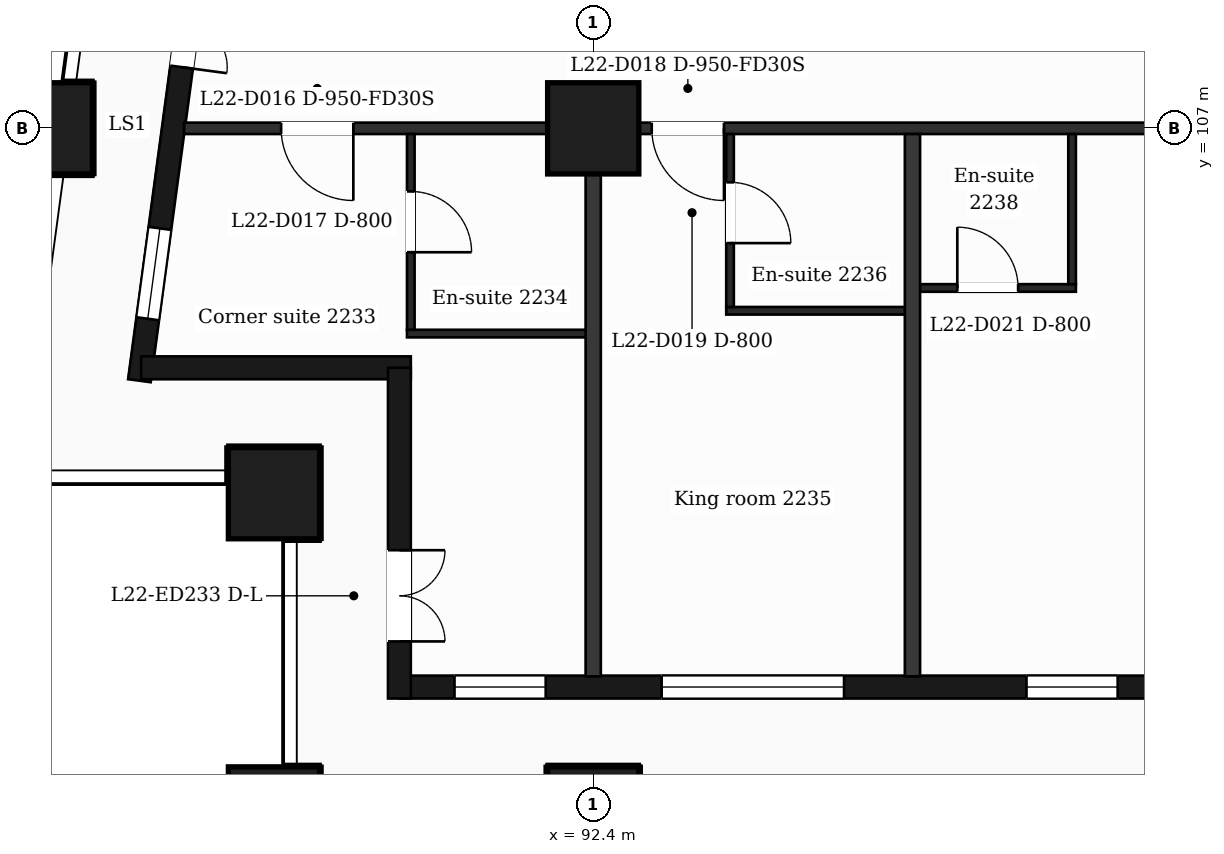
"""IFC4 building model, lengths in metres.
Left out: names, types, materials, properties, quantities, classifications, styles, units other than length and angle.
Written with IfcOpenShell. Run it as: python <this file> out.ifc"""

import sys

from ifc_helpers import new_model, si_unit, direction, frame, frame_2d, origin, origin_2d, place, context, subcontext, project, spatial, rectangle, extrude, element, fill, save


model = new_model("IFC4")
c1 = context("Model", 3, precision=1e-05, world=origin(), true_north=direction((0.0, 1.0)))
c2 = subcontext(c1, "Body", "Model", "MODEL_VIEW")
j1 = project(units=[si_unit("LENGTHUNIT", "METRE"), si_unit("PLANEANGLEUNIT", "RADIAN")], contexts=[c1])
p1 = place(None, origin())
s1 = spatial("IfcSite", under=j1, at=p1, CompositionType="ELEMENT")
p2 = place(p1, origin())
s2 = spatial("IfcBuilding", under=s1, at=p2, CompositionType="ELEMENT")
p3 = place(p2, frame((0.0, 0.0, 98.4)))
s3 = spatial("IfcBuildingStorey", under=s2, at=p3, CompositionType="ELEMENT", Elevation=98.4)
for number, where, z_axis, x_axis in (
    (1, (92.4, 98.0, 0.0), (0.0, 0.0, 1.0), (1.0, 0.0, 0.0)),
    (2, (88.2, 98.0, 0.0), (0.0, 0.0, 1.0), (1.0, 0.0, 0.0)),
    (3, (88.2, 102.2, 0.0), (0.0, 0.0, 1.0), (1.0, 0.0, 0.0)),
    (4, (92.4, 107.0, 0.0), (0.0, 0.0, 1.0), (1.0, 0.0, 0.0)),
    (5, (85.211, 107.0, 0.0), (0.0, 0.0, 1.0), (1.0, 0.0, 0.0)),
):
    element("IfcColumn", number, at=place(p3, frame(where, z_axis=z_axis, x_axis=x_axis)), inside=s3, PredefinedType="COLUMN", context=c2, shape_type="SweptSolid", body=[
        extrude(rectangle(XDim=1.2, YDim=1.2, at=origin_2d()), origin(), (0.0, 0.0, 1.0), 3.7),
    ])
p4 = place(p3, frame((89.85, 99.65, 0.0), z_axis=(0.0, 0.0, 1.0), x_axis=(1.0, 0.0, 0.0)))
e6 = element("IfcWall", 6, at=p4, inside=s3, PredefinedType="SOLIDWALL", context=c2, shape_type="SweptSolid", body=[
    extrude(rectangle(XDim=47.25, YDim=0.3, at=frame_2d((23.625, 0.0))), origin(), (0.0, 0.0, 1.0), 3.38),
])
p5 = place(p4, frame((0.725, 0.0, 0.9)))
e7 = element("IfcOpeningElement", 7, at=p5, cuts=e6, PredefinedType="OPENING", context=c2, shape_type="SweptSolid", body=[
    extrude(rectangle(XDim=1.2, YDim=2.1, at=frame_2d((0.6, 1.05))), frame((0.0, 0.16, 0.0), z_axis=(0.0, -1.0, 0.0), x_axis=(1.0, 0.0, 0.0)), (0.0, 0.0, 1.0), 0.32),
])
p6 = place(p4, frame((3.45, 0.0, 0.9)))
e8 = element("IfcOpeningElement", 8, at=p6, cuts=e6, PredefinedType="OPENING", context=c2, shape_type="SweptSolid", body=[
    extrude(rectangle(XDim=2.4, YDim=2.1, at=frame_2d((1.2, 1.05))), frame((0.0, 0.16, 0.0), z_axis=(0.0, -1.0, 0.0), x_axis=(1.0, 0.0, 0.0)), (0.0, 0.0, 1.0), 0.32),
])
p7 = place(p4, frame((8.25, 0.0, 0.9)))
e9 = element("IfcOpeningElement", 9, at=p7, cuts=e6, PredefinedType="OPENING", context=c2, shape_type="SweptSolid", body=[
    extrude(rectangle(XDim=1.2, YDim=2.1, at=frame_2d((0.6, 1.05))), frame((0.0, 0.16, 0.0), z_axis=(0.0, -1.0, 0.0), x_axis=(1.0, 0.0, 0.0)), (0.0, 0.0, 1.0), 0.32),
])
p8 = place(p4, frame((12.45, 0.0, 0.9)))
e10 = element("IfcOpeningElement", 10, at=p8, cuts=e6, PredefinedType="OPENING", context=c2, shape_type="SweptSolid", body=[
    extrude(rectangle(XDim=1.2, YDim=2.1, at=frame_2d((0.6, 1.05))), frame((0.0, 0.16, 0.0), z_axis=(0.0, -1.0, 0.0), x_axis=(1.0, 0.0, 0.0)), (0.0, 0.0, 1.0), 0.32),
])
p9 = place(p4, frame((16.05, 0.0, 0.9)))
e11 = element("IfcOpeningElement", 11, at=p9, cuts=e6, PredefinedType="OPENING", context=c2, shape_type="SweptSolid", body=[
    extrude(rectangle(XDim=2.4, YDim=2.1, at=frame_2d((1.2, 1.05))), frame((0.0, 0.16, 0.0), z_axis=(0.0, -1.0, 0.0), x_axis=(1.0, 0.0, 0.0)), (0.0, 0.0, 1.0), 0.32),
])
p10 = place(p4, frame((20.25, 0.0, 0.9)))
e12 = element("IfcOpeningElement", 12, at=p10, cuts=e6, PredefinedType="OPENING", context=c2, shape_type="SweptSolid", body=[
    extrude(rectangle(XDim=2.4, YDim=2.1, at=frame_2d((1.2, 1.05))), frame((0.0, 0.16, 0.0), z_axis=(0.0, -1.0, 0.0), x_axis=(1.0, 0.0, 0.0)), (0.0, 0.0, 1.0), 0.32),
])
p11 = place(p4, frame((25.05, 0.0, 0.0)))
e13 = element("IfcOpeningElement", 13, at=p11, cuts=e6, PredefinedType="OPENING", context=c2, shape_type="SweptSolid", body=[
    extrude(rectangle(XDim=1.2, YDim=2.4, at=frame_2d((0.6, 1.2))), frame((0.0, 0.16, 0.0), z_axis=(0.0, -1.0, 0.0), x_axis=(1.0, 0.0, 0.0)), (0.0, 0.0, 1.0), 0.32),
])
p12 = place(p4, frame((28.65, 0.0, 0.9)))
e14 = element("IfcOpeningElement", 14, at=p12, cuts=e6, PredefinedType="OPENING", context=c2, shape_type="SweptSolid", body=[
    extrude(rectangle(XDim=2.4, YDim=2.1, at=frame_2d((1.2, 1.05))), frame((0.0, 0.16, 0.0), z_axis=(0.0, -1.0, 0.0), x_axis=(1.0, 0.0, 0.0)), (0.0, 0.0, 1.0), 0.32),
])
p13 = place(p4, frame((32.85, 0.0, 0.9)))
e15 = element("IfcOpeningElement", 15, at=p13, cuts=e6, PredefinedType="OPENING", context=c2, shape_type="SweptSolid", body=[
    extrude(rectangle(XDim=2.4, YDim=2.1, at=frame_2d((1.2, 1.05))), frame((0.0, 0.16, 0.0), z_axis=(0.0, -1.0, 0.0), x_axis=(1.0, 0.0, 0.0)), (0.0, 0.0, 1.0), 0.32),
])
p14 = place(p4, frame((37.65, 0.0, 0.9)))
e16 = element("IfcOpeningElement", 16, at=p14, cuts=e6, PredefinedType="OPENING", context=c2, shape_type="SweptSolid", body=[
    extrude(rectangle(XDim=1.2, YDim=2.1, at=frame_2d((0.6, 1.05))), frame((0.0, 0.16, 0.0), z_axis=(0.0, -1.0, 0.0), x_axis=(1.0, 0.0, 0.0)), (0.0, 0.0, 1.0), 0.32),
])
p15 = place(p4, frame((41.85, 0.0, 0.9)))
e17 = element("IfcOpeningElement", 17, at=p15, cuts=e6, PredefinedType="OPENING", context=c2, shape_type="SweptSolid", body=[
    extrude(rectangle(XDim=1.2, YDim=2.1, at=frame_2d((0.6, 1.05))), frame((0.0, 0.16, 0.0), z_axis=(0.0, -1.0, 0.0), x_axis=(1.0, 0.0, 0.0)), (0.0, 0.0, 1.0), 0.32),
])
p16 = place(p4, frame((45.25, 0.0, 0.9)))
e18 = element("IfcOpeningElement", 18, at=p16, cuts=e6, PredefinedType="OPENING", context=c2, shape_type="SweptSolid", body=[
    extrude(rectangle(XDim=1.2, YDim=2.1, at=frame_2d((0.6, 1.05))), frame((0.0, 0.16, 0.0), z_axis=(0.0, -1.0, 0.0), x_axis=(1.0, 0.0, 0.0)), (0.0, 0.0, 1.0), 0.32),
])
p17 = place(p3, frame((87.334, 110.4, 0.0), z_axis=(0.0, 0.0, 1.0), x_axis=(-0.133437175554, -0.991057273915, 0.0)))
e19 = element("IfcWall", 19, at=p17, inside=s3, PredefinedType="SOLIDWALL", context=c2, shape_type="SweptSolid", body=[
    extrude(rectangle(XDim=6.781, YDim=0.3, at=frame_2d((3.39, 0.0))), origin(), (0.0, 0.0, 1.0), 3.38),
])
p18 = place(p17, frame((1.418, 0.0, 0.0)))
e20 = element("IfcOpeningElement", 20, at=p18, cuts=e19, PredefinedType="OPENING", context=c2, shape_type="SweptSolid", body=[
    extrude(rectangle(XDim=1.2, YDim=2.4, at=frame_2d((0.6, 1.2))), frame((0.0, 0.16, 0.0), z_axis=(0.0, -1.0, 0.0), x_axis=(1.0, 0.0, 0.0)), (0.0, 0.0, 1.0), 0.32),
])
p19 = place(p17, frame((4.758, 0.0, 0.9)))
e21 = element("IfcOpeningElement", 21, at=p19, cuts=e19, PredefinedType="OPENING", context=c2, shape_type="SweptSolid", body=[
    extrude(rectangle(XDim=1.2, YDim=2.1, at=frame_2d((0.6, 1.05))), frame((0.0, 0.16, 0.0), z_axis=(0.0, -1.0, 0.0), x_axis=(1.0, 0.0, 0.0)), (0.0, 0.0, 1.0), 0.32),
])
p20 = place(p3, frame((86.452, 103.85, 0.0), z_axis=(0.0, 0.0, 1.0), x_axis=(1.0, 0.0, 0.0)))
e22 = element("IfcWall", 22, at=p20, inside=s3, PredefinedType="SOLIDWALL", context=c2, shape_type="SweptSolid", body=[
    extrude(rectangle(XDim=3.548, YDim=0.3, at=frame_2d((1.774, 0.0))), origin(), (0.0, 0.0, 1.0), 3.38),
])
p21 = place(p3, frame((89.85, 103.85, 0.0), z_axis=(0.0, 0.0, 1.0), x_axis=(0.0, -1.0, 0.0)))
e23 = element("IfcWall", 23, at=p21, inside=s3, PredefinedType="SOLIDWALL", context=c2, shape_type="SweptSolid", body=[
    extrude(rectangle(XDim=4.35, YDim=0.3, at=frame_2d((2.175, 0.0))), origin(), (0.0, 0.0, 1.0), 3.38),
])
p22 = place(p21, frame((2.4, 0.0, 0.0)))
e24 = element("IfcOpeningElement", 24, at=p22, cuts=e23, PredefinedType="OPENING", context=c2, shape_type="SweptSolid", body=[
    extrude(rectangle(XDim=1.2, YDim=2.4, at=frame_2d((0.6, 1.2))), frame((0.0, 0.16, 0.0), z_axis=(0.0, -1.0, 0.0), x_axis=(1.0, 0.0, 0.0)), (0.0, 0.0, 1.0), 0.32),
])
p23 = place(p3, frame((89.95, 104.3, 0.0), z_axis=(0.0, 0.0, 1.0), x_axis=(1.0, 0.0, 0.0)))
e25 = element("IfcWall", 25, at=p23, inside=s3, PredefinedType="PARTITIONING", context=c2, shape_type="SweptSolid", body=[
    extrude(rectangle(XDim=2.45, YDim=0.1, at=frame_2d((1.225, 0.0))), origin(), (0.0, 0.0, 1.0), 3.38),
])
p24 = place(p3, frame((94.15, 104.6, 0.0), z_axis=(0.0, 0.0, 1.0), x_axis=(1.0, 0.0, 0.0)))
e26 = element("IfcWall", 26, at=p24, inside=s3, PredefinedType="PARTITIONING", context=c2, shape_type="SweptSolid", body=[
    extrude(rectangle(XDim=2.45, YDim=0.1, at=frame_2d((1.225, 0.0))), origin(), (0.0, 0.0, 1.0), 3.38),
])
p25 = place(p3, frame((96.6, 104.9, 0.0), z_axis=(0.0, 0.0, 1.0), x_axis=(1.0, 0.0, 0.0)))
e27 = element("IfcWall", 27, at=p25, inside=s3, PredefinedType="PARTITIONING", context=c2, shape_type="SweptSolid", body=[
    extrude(rectangle(XDim=2.15, YDim=0.1, at=frame_2d((1.075, 0.0))), origin(), (0.0, 0.0, 1.0), 3.38),
])
p26 = place(p25, frame((0.59, 0.0, 0.0)))
e28 = element("IfcOpeningElement", 28, at=p26, cuts=e27, PredefinedType="OPENING", context=c2, shape_type="SweptSolid", body=[
    extrude(rectangle(XDim=0.8, YDim=2.1, at=frame_2d((0.4, 1.05))), frame((0.0, 0.06, 0.0), z_axis=(0.0, -1.0, 0.0), x_axis=(1.0, 0.0, 0.0)), (0.0, 0.0, 1.0), 0.12),
])
p27 = place(p3, frame((87.018, 107.0, 0.0), z_axis=(0.0, 0.0, 1.0), x_axis=(1.0, 0.0, 0.0)))
e29 = element("IfcWall", 29, at=p27, inside=s3, PredefinedType="PARTITIONING", context=c2, shape_type="SweptSolid", body=[
    extrude(rectangle(XDim=52.765, YDim=0.15, at=frame_2d((26.382, 0.0))), origin(), (0.0, 0.0, 1.0), 3.38),
])
p28 = place(p27, frame((1.276, 0.0, 0.0)))
e30 = element("IfcOpeningElement", 30, at=p28, cuts=e29, PredefinedType="OPENING", context=c2, shape_type="SweptSolid", body=[
    extrude(rectangle(XDim=0.95, YDim=2.1, at=frame_2d((0.475, 1.05))), frame((0.0, 0.085, 0.0), z_axis=(0.0, -1.0, 0.0), x_axis=(1.0, 0.0, 0.0)), (0.0, 0.0, 1.0), 0.17),
])
p29 = place(p27, frame((6.152, 0.0, 0.0)))
e31 = element("IfcOpeningElement", 31, at=p29, cuts=e29, PredefinedType="OPENING", context=c2, shape_type="SweptSolid", body=[
    extrude(rectangle(XDim=0.95, YDim=2.1, at=frame_2d((0.475, 1.05))), frame((0.0, 0.085, 0.0), z_axis=(0.0, -1.0, 0.0), x_axis=(1.0, 0.0, 0.0)), (0.0, 0.0, 1.0), 0.17),
])
p30 = place(p27, frame((14.59, 0.0, 0.0)))
e32 = element("IfcOpeningElement", 32, at=p30, cuts=e29, PredefinedType="OPENING", context=c2, shape_type="SweptSolid", body=[
    extrude(rectangle(XDim=0.95, YDim=2.1, at=frame_2d((0.475, 1.05))), frame((0.0, 0.085, 0.0), z_axis=(0.0, -1.0, 0.0), x_axis=(1.0, 0.0, 0.0)), (0.0, 0.0, 1.0), 0.17),
])
p31 = place(p27, frame((18.257, 0.0, 0.0)))
e33 = element("IfcOpeningElement", 33, at=p31, cuts=e29, PredefinedType="OPENING", context=c2, shape_type="SweptSolid", body=[
    extrude(rectangle(XDim=0.95, YDim=2.1, at=frame_2d((0.475, 1.05))), frame((0.0, 0.085, 0.0), z_axis=(0.0, -1.0, 0.0), x_axis=(1.0, 0.0, 0.0)), (0.0, 0.0, 1.0), 0.17),
])
p32 = place(p27, frame((26.672, 0.0, 0.0)))
e34 = element("IfcOpeningElement", 34, at=p32, cuts=e29, PredefinedType="OPENING", context=c2, shape_type="SweptSolid", body=[
    extrude(rectangle(XDim=0.95, YDim=2.1, at=frame_2d((0.475, 1.05))), frame((0.0, 0.085, 0.0), z_axis=(0.0, -1.0, 0.0), x_axis=(1.0, 0.0, 0.0)), (0.0, 0.0, 1.0), 0.17),
])
p33 = place(p27, frame((31.392, 0.0, 0.0)))
e35 = element("IfcOpeningElement", 35, at=p33, cuts=e29, PredefinedType="OPENING", context=c2, shape_type="SweptSolid", body=[
    extrude(rectangle(XDim=0.95, YDim=2.1, at=frame_2d((0.475, 1.05))), frame((0.0, 0.085, 0.0), z_axis=(0.0, -1.0, 0.0), x_axis=(1.0, 0.0, 0.0)), (0.0, 0.0, 1.0), 0.17),
])
p34 = place(p27, frame((37.182, 0.0, 0.0)))
e36 = element("IfcOpeningElement", 36, at=p34, cuts=e29, PredefinedType="OPENING", context=c2, shape_type="SweptSolid", body=[
    extrude(rectangle(XDim=0.95, YDim=2.1, at=frame_2d((0.475, 1.05))), frame((0.0, 0.085, 0.0), z_axis=(0.0, -1.0, 0.0), x_axis=(1.0, 0.0, 0.0)), (0.0, 0.0, 1.0), 0.17),
])
p35 = place(p27, frame((41.762, 0.0, 0.0)))
e37 = element("IfcOpeningElement", 37, at=p35, cuts=e29, PredefinedType="OPENING", context=c2, shape_type="SweptSolid", body=[
    extrude(rectangle(XDim=0.95, YDim=2.1, at=frame_2d((0.475, 1.05))), frame((0.0, 0.085, 0.0), z_axis=(0.0, -1.0, 0.0), x_axis=(1.0, 0.0, 0.0)), (0.0, 0.0, 1.0), 0.17),
])
p36 = place(p27, frame((49.285, 0.0, 0.0)))
e38 = element("IfcOpeningElement", 38, at=p36, cuts=e29, PredefinedType="OPENING", context=c2, shape_type="SweptSolid", body=[
    extrude(rectangle(XDim=0.95, YDim=2.1, at=frame_2d((0.475, 1.05))), frame((0.0, 0.085, 0.0), z_axis=(0.0, -1.0, 0.0), x_axis=(1.0, 0.0, 0.0)), (0.0, 0.0, 1.0), 0.17),
])
p37 = place(p3, frame((90.0, 104.35, 0.0), z_axis=(0.0, 0.0, 1.0), x_axis=(0.0, 1.0, 0.0)))
e39 = element("IfcWall", 39, at=p37, inside=s3, PredefinedType="PARTITIONING", context=c2, shape_type="SweptSolid", body=[
    extrude(rectangle(XDim=2.575, YDim=0.1, at=frame_2d((1.288, 0.0))), origin(), (0.0, 0.0, 1.0), 3.38),
])
p38 = place(p37, frame((1.02, 0.0, 0.0)))
e40 = element("IfcOpeningElement", 40, at=p38, cuts=e39, PredefinedType="OPENING", context=c2, shape_type="SweptSolid", body=[
    extrude(rectangle(XDim=0.8, YDim=2.1, at=frame_2d((0.4, 1.05))), frame((0.0, 0.06, 0.0), z_axis=(0.0, -1.0, 0.0), x_axis=(1.0, 0.0, 0.0)), (0.0, 0.0, 1.0), 0.12),
])
p39 = place(p3, frame((92.4, 99.79, 0.0), z_axis=(0.0, 0.0, 1.0), x_axis=(0.0, 1.0, 0.0)))
e41 = element("IfcWall", 41, at=p39, inside=s3, PredefinedType="PARTITIONING", context=c2, shape_type="SweptSolid", body=[
    extrude(rectangle(XDim=7.135, YDim=0.2, at=frame_2d((3.567, 0.0))), origin(), (0.0, 0.0, 1.0), 3.38),
])
p40 = place(p3, frame((94.2, 104.65, 0.0), z_axis=(0.0, 0.0, 1.0), x_axis=(0.0, 1.0, 0.0)))
e42 = element("IfcWall", 42, at=p40, inside=s3, PredefinedType="PARTITIONING", context=c2, shape_type="SweptSolid", body=[
    extrude(rectangle(XDim=2.275, YDim=0.1, at=frame_2d((1.138, 0.0))), origin(), (0.0, 0.0, 1.0), 3.38),
])
p41 = place(p40, frame((0.84, 0.0, 0.0)))
e43 = element("IfcOpeningElement", 43, at=p41, cuts=e42, PredefinedType="OPENING", context=c2, shape_type="SweptSolid", body=[
    extrude(rectangle(XDim=0.8, YDim=2.1, at=frame_2d((0.4, 1.05))), frame((0.0, 0.06, 0.0), z_axis=(0.0, -1.0, 0.0), x_axis=(1.0, 0.0, 0.0)), (0.0, 0.0, 1.0), 0.12),
])
p42 = place(p3, frame((96.6, 99.79, 0.0), z_axis=(0.0, 0.0, 1.0), x_axis=(0.0, 1.0, 0.0)))
e44 = element("IfcWall", 44, at=p42, inside=s3, PredefinedType="PARTITIONING", context=c2, shape_type="SweptSolid", body=[
    extrude(rectangle(XDim=7.135, YDim=0.2, at=frame_2d((3.567, 0.0))), origin(), (0.0, 0.0, 1.0), 3.38),
])
p43 = place(p3, frame((98.7, 104.95, 0.0), z_axis=(0.0, 0.0, 1.0), x_axis=(0.0, 1.0, 0.0)))
e45 = element("IfcWall", 45, at=p43, inside=s3, PredefinedType="PARTITIONING", context=c2, shape_type="SweptSolid", body=[
    extrude(rectangle(XDim=1.975, YDim=0.1, at=frame_2d((0.988, 0.0))), origin(), (0.0, 0.0, 1.0), 3.38),
])
p44 = place(p5, origin())
e46 = element("IfcWindow", 46, at=p44, inside=s3, PartitioningType="SINGLE_PANEL", PredefinedType="WINDOW", context=c2, shape_type="SweptSolid", body=[
    extrude(rectangle(XDim=1.2, YDim=2.1, at=frame_2d((0.6, 1.05))), frame((0.0, 0.03, 0.0), z_axis=(0.0, -1.0, 0.0), x_axis=(1.0, 0.0, 0.0)), (0.0, 0.0, 1.0), 0.06),
])
fill(e7, e46)
p45 = place(p6, origin())
e47 = element("IfcWindow", 47, at=p45, inside=s3, PartitioningType="SINGLE_PANEL", PredefinedType="WINDOW", context=c2, shape_type="SweptSolid", body=[
    extrude(rectangle(XDim=2.4, YDim=2.1, at=frame_2d((1.2, 1.05))), frame((0.0, 0.03, 0.0), z_axis=(0.0, -1.0, 0.0), x_axis=(1.0, 0.0, 0.0)), (0.0, 0.0, 1.0), 0.06),
])
fill(e8, e47)
p46 = place(p7, origin())
e48 = element("IfcWindow", 48, at=p46, inside=s3, PartitioningType="SINGLE_PANEL", PredefinedType="WINDOW", context=c2, shape_type="SweptSolid", body=[
    extrude(rectangle(XDim=1.2, YDim=2.1, at=frame_2d((0.6, 1.05))), frame((0.0, 0.03, 0.0), z_axis=(0.0, -1.0, 0.0), x_axis=(1.0, 0.0, 0.0)), (0.0, 0.0, 1.0), 0.06),
])
fill(e9, e48)
p47 = place(p18, origin())
e49 = element("IfcDoor", 49, at=p47, inside=s3, OperationType="DOUBLE_DOOR_SINGLE_SWING", PredefinedType="DOOR", context=c2, shape_type="SweptSolid", body=[
    extrude(rectangle(XDim=1.2, YDim=2.4, at=frame_2d((0.6, 1.2))), frame((0.0, 0.025, 0.0), z_axis=(0.0, -1.0, 0.0), x_axis=(1.0, 0.0, 0.0)), (0.0, 0.0, 1.0), 0.05),
])
fill(e20, e49)
p48 = place(p19, origin())
e50 = element("IfcWindow", 50, at=p48, inside=s3, PartitioningType="SINGLE_PANEL", PredefinedType="WINDOW", context=c2, shape_type="SweptSolid", body=[
    extrude(rectangle(XDim=1.2, YDim=2.1, at=frame_2d((0.6, 1.05))), frame((0.0, 0.03, 0.0), z_axis=(0.0, -1.0, 0.0), x_axis=(1.0, 0.0, 0.0)), (0.0, 0.0, 1.0), 0.06),
])
fill(e21, e50)
p49 = place(p22, origin())
e51 = element("IfcDoor", 51, at=p49, inside=s3, OperationType="DOUBLE_DOOR_SINGLE_SWING", PredefinedType="DOOR", context=c2, shape_type="SweptSolid", body=[
    extrude(rectangle(XDim=1.2, YDim=2.4, at=frame_2d((0.6, 1.2))), frame((0.0, 0.025, 0.0), z_axis=(0.0, -1.0, 0.0), x_axis=(1.0, 0.0, 0.0)), (0.0, 0.0, 1.0), 0.05),
])
fill(e24, e51)
p50 = place(p28, origin())
e52 = element("IfcDoor", 52, at=p50, inside=s3, OperationType="SINGLE_SWING_RIGHT", PredefinedType="DOOR", context=c2, shape_type="SweptSolid", body=[
    extrude(rectangle(XDim=0.95, YDim=2.1, at=frame_2d((0.475, 1.05))), frame((0.0, 0.025, 0.0), z_axis=(0.0, -1.0, 0.0), x_axis=(1.0, 0.0, 0.0)), (0.0, 0.0, 1.0), 0.05),
])
fill(e30, e52)
p51 = place(p38, origin())
e53 = element("IfcDoor", 53, at=p51, inside=s3, OperationType="SINGLE_SWING_LEFT", PredefinedType="DOOR", context=c2, shape_type="SweptSolid", body=[
    extrude(rectangle(XDim=0.8, YDim=2.1, at=frame_2d((0.4, 1.05))), frame((0.0, 0.025, 0.0), z_axis=(0.0, -1.0, 0.0), x_axis=(1.0, 0.0, 0.0)), (0.0, 0.0, 1.0), 0.05),
])
fill(e40, e53)
p52 = place(p29, origin())
e54 = element("IfcDoor", 54, at=p52, inside=s3, OperationType="SINGLE_SWING_RIGHT", PredefinedType="DOOR", context=c2, shape_type="SweptSolid", body=[
    extrude(rectangle(XDim=0.95, YDim=2.1, at=frame_2d((0.475, 1.05))), frame((0.0, 0.025, 0.0), z_axis=(0.0, -1.0, 0.0), x_axis=(1.0, 0.0, 0.0)), (0.0, 0.0, 1.0), 0.05),
])
fill(e31, e54)
p53 = place(p41, origin())
e55 = element("IfcDoor", 55, at=p53, inside=s3, OperationType="SINGLE_SWING_LEFT", PredefinedType="DOOR", context=c2, shape_type="SweptSolid", body=[
    extrude(rectangle(XDim=0.8, YDim=2.1, at=frame_2d((0.4, 1.05))), frame((0.0, 0.025, 0.0), z_axis=(0.0, -1.0, 0.0), x_axis=(1.0, 0.0, 0.0)), (0.0, 0.0, 1.0), 0.05),
])
fill(e43, e55)
p54 = place(p26, origin())
e56 = element("IfcDoor", 56, at=p54, inside=s3, OperationType="SINGLE_SWING_LEFT", PredefinedType="DOOR", context=c2, shape_type="SweptSolid", body=[
    extrude(rectangle(XDim=0.8, YDim=2.1, at=frame_2d((0.4, 1.05))), frame((0.0, 0.025, 0.0), z_axis=(0.0, -1.0, 0.0), x_axis=(1.0, 0.0, 0.0)), (0.0, 0.0, 1.0), 0.05),
])
fill(e28, e56)
save(model, sys.argv[1])
